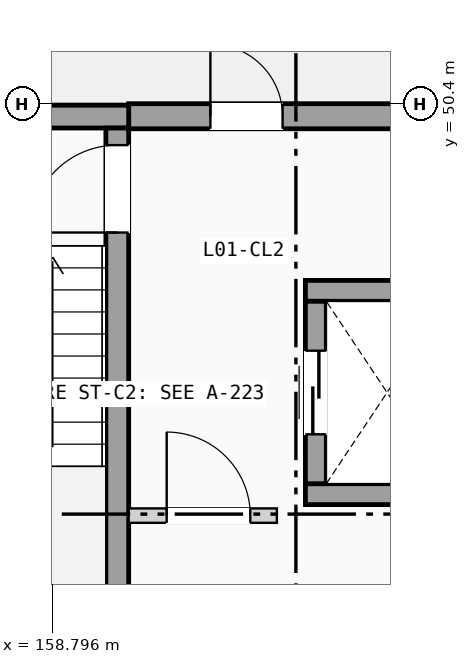
"""IFC4 building model, lengths in metres.
Left out: names, types, materials, properties, quantities, classifications, styles, units other than length and angle.
Written with IfcOpenShell. Run it as: python <this file> out.ifc"""

import sys

from ifc_helpers import new_model, si_unit, direction, frame, frame_2d, origin, place, context, subcontext, project, spatial, rectangle, extrude, element, fill, save


model = new_model("IFC4")
c1 = context("Model", 3, precision=1e-05, world=origin(), true_north=direction((0.0, 1.0)))
c2 = subcontext(c1, "Body", "Model", "MODEL_VIEW")
j1 = project(units=[si_unit("LENGTHUNIT", "METRE"), si_unit("PLANEANGLEUNIT", "RADIAN")], contexts=[c1])
p1 = place(None, origin())
s1 = spatial("IfcSite", under=j1, at=p1, CompositionType="ELEMENT")
p2 = place(p1, origin())
s2 = spatial("IfcBuilding", under=s1, at=p2, CompositionType="ELEMENT")
p3 = place(p2, frame((0.0, 0.0, 4.9)))
s3 = spatial("IfcBuildingStorey", under=s2, at=p3, CompositionType="ELEMENT", Elevation=4.9)
p4 = place(p3, frame((159.8, 50.235, 0.0), z_axis=(0.0, 0.0, 1.0), x_axis=(1.0, 0.0, 0.0)))
e1 = element("IfcWall", 1, at=p4, inside=s3, PredefinedType="SOLIDWALL", context=c2, shape_type="SweptSolid", body=[
    extrude(rectangle(XDim=4.075, YDim=0.33, at=frame_2d((2.038, 0.0))), origin(), (0.0, 0.0, 1.0), 3.415),
])
p5 = place(p4, frame((1.075, 0.0, 0.0)))
e2 = element("IfcOpeningElement", 2, at=p5, cuts=e1, PredefinedType="OPENING", context=c2, shape_type="SweptSolid", body=[
    extrude(rectangle(XDim=0.95, YDim=2.15, at=frame_2d((0.475, 1.075))), frame((0.0, 0.175, 0.0), z_axis=(0.0, -1.0, 0.0), x_axis=(1.0, 0.0, 0.0)), (0.0, 0.0, 1.0), 0.35),
])
p6 = place(p3, frame((156.2, 50.23, 0.0), z_axis=(0.0, 0.0, 1.0), x_axis=(1.0, 0.0, 0.0)))
e3 = element("IfcWall", 3, at=p6, inside=s3, PredefinedType="SHEAR", context=c2, shape_type="SweptSolid", body=[
    extrude(rectangle(XDim=3.6, YDim=0.3, at=frame_2d((1.8, 0.0))), origin(), (0.0, 0.0, 1.0), 3.415),
])
p7 = place(p3, frame((159.65, 43.08, 0.0), z_axis=(0.0, 0.0, 1.0), x_axis=(0.0, 1.0, 0.0)))
e4 = element("IfcWall", 4, at=p7, inside=s3, PredefinedType="SHEAR", context=c2, shape_type="SweptSolid", body=[
    extrude(rectangle(XDim=7.0, YDim=0.3, at=frame_2d((3.5, 0.0))), origin(), (0.0, 0.0, 1.0), 3.415),
])
p8 = place(p7, frame((5.625, 0.0, 0.0)))
e5 = element("IfcOpeningElement", 5, at=p8, cuts=e4, PredefinedType="OPENING", context=c2, shape_type="SweptSolid", body=[
    extrude(rectangle(XDim=1.15, YDim=2.12, at=frame_2d((0.575, 1.06))), frame((0.0, 0.16, 0.0), z_axis=(0.0, -1.0, 0.0), x_axis=(1.0, 0.0, 0.0)), (0.0, 0.0, 1.0), 0.32),
])
for number, where, z_axis, x_axis in (
    (6, (162.125, 45.262, 0.0), (0.0, 0.0, 1.0), (1.0, 0.0, 0.0)),
    (7, (162.125, 47.938, 0.0), (0.0, 0.0, 1.0), (1.0, 0.0, 0.0)),
):
    element("IfcWall", number, at=place(p3, frame(where, z_axis=z_axis, x_axis=x_axis)), inside=s3, PredefinedType="SHEAR", context=c2, shape_type="SweptSolid", body=[
        extrude(rectangle(XDim=2.15, YDim=0.275, at=frame_2d((1.075, 0.0))), origin(), (0.0, 0.0, 1.0), 3.415),
    ])
p9 = place(p3, frame((162.262, 45.4, 0.0), z_axis=(0.0, 0.0, 1.0), x_axis=(0.0, 1.0, 0.0)))
e8 = element("IfcWall", 8, at=p9, inside=s3, PredefinedType="SHEAR", context=c2, shape_type="SweptSolid", body=[
    extrude(rectangle(XDim=2.4, YDim=0.275, at=frame_2d((1.2, 0.0))), origin(), (0.0, 0.0, 1.0), 3.415),
])
p10 = place(p9, frame((0.65, 0.0, 0.0)))
e9 = element("IfcOpeningElement", 9, at=p10, cuts=e8, PredefinedType="OPENING", context=c2, shape_type="SweptSolid", body=[
    extrude(rectangle(XDim=1.1, YDim=2.15, at=frame_2d((0.55, 1.075))), frame((0.0, 0.147, 0.0), z_axis=(0.0, -1.0, 0.0), x_axis=(1.0, 0.0, 0.0)), (0.0, 0.0, 1.0), 0.295),
])
p11 = place(p3, frame((159.8, 44.98, 0.0), z_axis=(0.0, 0.0, 1.0), x_axis=(1.0, 0.0, 0.0)))
e10 = element("IfcWall", 10, at=p11, inside=s3, PredefinedType="PARTITIONING", context=c2, shape_type="SweptSolid", body=[
    extrude(rectangle(XDim=1.95, YDim=0.19, at=frame_2d((0.975, 0.0))), origin(), (0.0, 0.0, 1.0), 3.395),
])
p12 = place(p11, frame((0.5, 0.0, 0.0)))
e11 = element("IfcOpeningElement", 11, at=p12, cuts=e10, PredefinedType="OPENING", context=c2, shape_type="SweptSolid", body=[
    extrude(rectangle(XDim=1.1, YDim=2.12, at=frame_2d((0.55, 1.06))), frame((0.0, 0.105, 0.0), z_axis=(0.0, -1.0, 0.0), x_axis=(1.0, 0.0, 0.0)), (0.0, 0.0, 1.0), 0.21),
])
p13 = place(p5, origin())
e12 = element("IfcDoor", 12, at=p13, inside=s3, OperationType="SINGLE_SWING_LEFT", PredefinedType="DOOR", context=c2, shape_type="SweptSolid", body=[
    extrude(rectangle(XDim=0.95, YDim=2.15, at=frame_2d((0.475, 1.075))), frame((0.0, 0.025, 0.0), z_axis=(0.0, -1.0, 0.0), x_axis=(1.0, 0.0, 0.0)), (0.0, 0.0, 1.0), 0.05),
])
fill(e2, e12)
p14 = place(p8, origin())
e13 = element("IfcDoor", 13, at=p14, inside=s3, OperationType="SINGLE_SWING_LEFT", PredefinedType="DOOR", context=c2, shape_type="SweptSolid", body=[
    extrude(rectangle(XDim=1.15, YDim=2.12, at=frame_2d((0.575, 1.06))), frame((0.0, 0.025, 0.0), z_axis=(0.0, -1.0, 0.0), x_axis=(1.0, 0.0, 0.0)), (0.0, 0.0, 1.0), 0.05),
])
fill(e5, e13)
p15 = place(p10, origin())
e14 = element("IfcDoor", 14, at=p15, inside=s3, OperationType="SLIDING_TO_LEFT", PredefinedType="DOOR", context=c2, shape_type="SweptSolid", body=[
    extrude(rectangle(XDim=1.1, YDim=2.15, at=frame_2d((0.55, 1.075))), frame((0.0, 0.025, 0.0), z_axis=(0.0, -1.0, 0.0), x_axis=(1.0, 0.0, 0.0)), (0.0, 0.0, 1.0), 0.05),
])
fill(e9, e14)
p16 = place(p12, origin())
e15 = element("IfcDoor", 15, at=p16, inside=s3, OperationType="SINGLE_SWING_LEFT", PredefinedType="DOOR", context=c2, shape_type="SweptSolid", body=[
    extrude(rectangle(XDim=1.1, YDim=2.12, at=frame_2d((0.55, 1.06))), frame((0.0, 0.025, 0.0), z_axis=(0.0, -1.0, 0.0), x_axis=(1.0, 0.0, 0.0)), (0.0, 0.0, 1.0), 0.05),
])
fill(e11, e15)
save(model, sys.argv[1])
